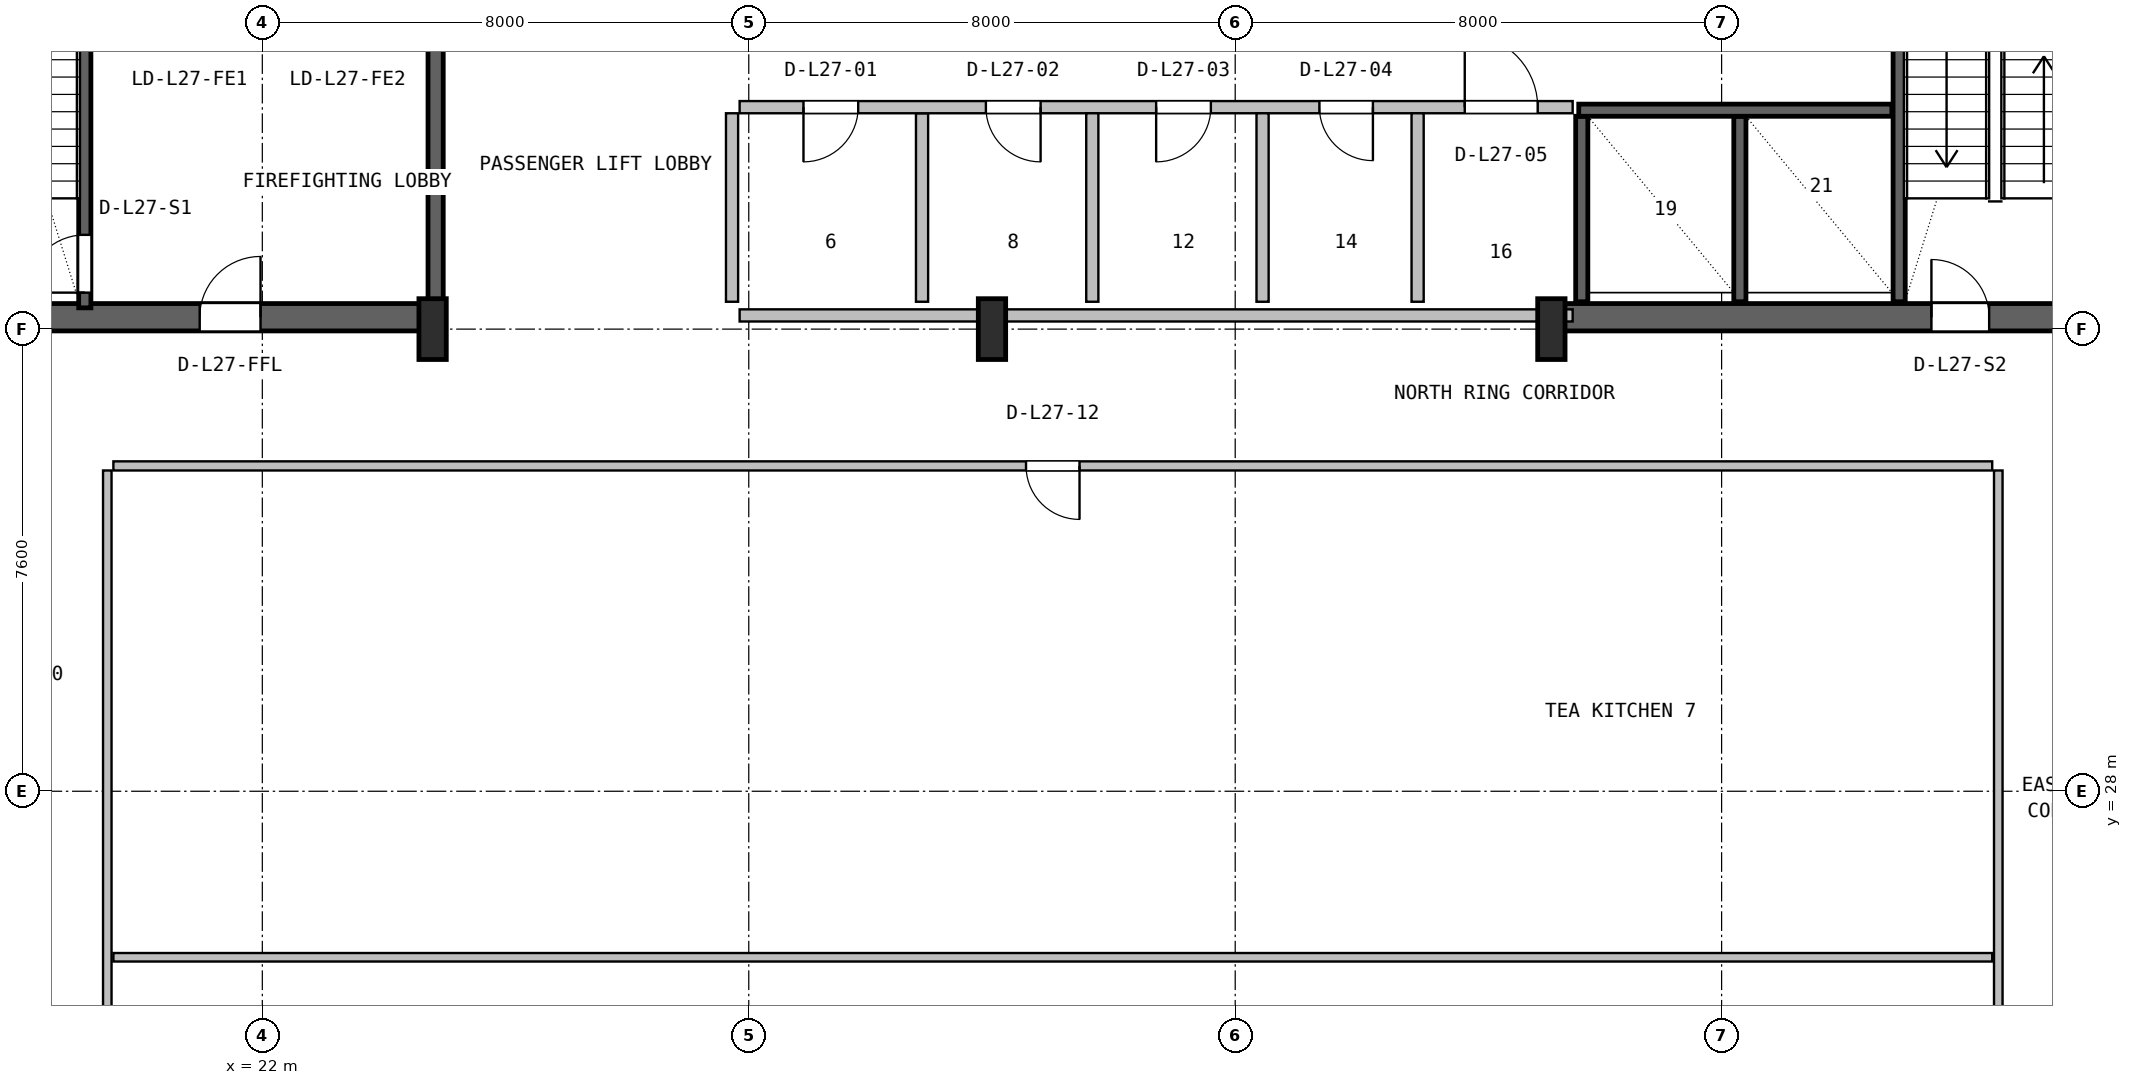
"""IFC4 building model, lengths in metres.
Left out: names, types, materials, properties, quantities, classifications, styles, units other than length and angle.
Written with IfcOpenShell. Run it as: python <this file> out.ifc"""

import sys

from ifc_helpers import new_model, si_unit, direction, frame, frame_2d, origin, origin_2d, place, context, subcontext, project, spatial, rectangle, i_section, extrude, source, transform, mapped, element, fill, save


model = new_model("IFC4")
c1 = context("Model", 3, precision=1e-05, world=origin(), true_north=direction((0.0, 1.0)))
c2 = subcontext(c1, "Body", "Model", "MODEL_VIEW")
j1 = project(units=[si_unit("LENGTHUNIT", "METRE"), si_unit("PLANEANGLEUNIT", "RADIAN")], contexts=[c1])
p1 = place(None, origin())
s1 = spatial("IfcSite", under=j1, at=p1, CompositionType="ELEMENT")
p2 = place(p1, origin())
s2 = spatial("IfcBuilding", under=s1, at=p2, CompositionType="ELEMENT")
p3 = place(p2, frame((0.0, 0.0, 114.4)))
s3 = spatial("IfcBuildingStorey", under=s2, at=p3, CompositionType="ELEMENT", Elevation=114.4)
p4 = place(p3, frame((15.57, 35.795, 0.0), z_axis=(0.0, 0.0, 1.0), x_axis=(1.0, 0.0, 0.0)))
e1 = element("IfcWall", 1, at=p4, inside=s3, PredefinedType="SHEAR", context=c2, shape_type="SweptSolid", body=[
    extrude(rectangle(XDim=9.23, YDim=0.45, at=frame_2d((4.615, 0.0))), origin(), (0.0, 0.0, 1.0), 3.55),
])
p5 = place(p4, frame((5.4, 0.0, 0.0)))
e2 = element("IfcOpeningElement", 2, at=p5, cuts=e1, PredefinedType="OPENING", context=c2, shape_type="SweptSolid", body=[
    extrude(rectangle(XDim=1.0, YDim=2.1, at=frame_2d((0.5, 1.05))), frame((0.0, 0.235, 0.0), z_axis=(0.0, -1.0, 0.0), x_axis=(1.0, 0.0, 0.0)), (0.0, 0.0, 1.0), 0.47),
])
p6 = place(p3, frame((43.2, 35.795, 0.0), z_axis=(0.0, 0.0, 1.0), x_axis=(1.0, 0.0, 0.0)))
e3 = element("IfcWall", 3, at=p6, inside=s3, PredefinedType="SHEAR", context=c2, shape_type="SweptSolid", body=[
    extrude(rectangle(XDim=9.23, YDim=0.45, at=frame_2d((4.615, 0.0))), origin(), (0.0, 0.0, 1.0), 3.55),
])
p7 = place(p6, frame((6.25, 0.0, 0.0)))
e4 = element("IfcOpeningElement", 4, at=p7, cuts=e3, PredefinedType="OPENING", context=c2, shape_type="SweptSolid", body=[
    extrude(rectangle(XDim=0.95, YDim=2.1, at=frame_2d((0.475, 1.05))), frame((0.0, 0.235, 0.0), z_axis=(0.0, -1.0, 0.0), x_axis=(1.0, 0.0, 0.0)), (0.0, 0.0, 1.0), 0.47),
])
m1 = source(origin(), c2, "Body", "SweptSolid", [
    extrude(i_section(OverallWidth=0.45, OverallDepth=1.0, WebThickness=0.016, FlangeThickness=0.03, FilletRadius=0.016, at=origin_2d()), origin(), (0.0, 0.0, 1.0), 3.8),
])
for number, where, z_axis, x_axis in (
    (5, (24.8, 35.6, 0.0), (0.0, 0.0, 1.0), (1.0, 0.0, 0.0)),
    (6, (34.0, 35.6, 0.0), (0.0, 0.0, 1.0), (1.0, 0.0, 0.0)),
    (7, (43.2, 35.6, 0.0), (0.0, 0.0, 1.0), (1.0, 0.0, 0.0)),
):
    element("IfcColumn", number, at=place(p3, frame(where, z_axis=z_axis, x_axis=x_axis)), inside=s3, PredefinedType="COLUMN", context=c2, shape_type="MappedRepresentation", body=[
        mapped(m1, transform((0.0, 0.0, 0.0), x_axis=(1.0, 0.0, 0.0), y_axis=(0.0, 1.0, 0.0), z_axis=(0.0, 0.0, 1.0), scale=1.0)),
    ])
p8 = place(p3, frame((19.08, 35.95, 0.0), z_axis=(0.0, 0.0, 1.0), x_axis=(0.0, 1.0, 0.0)))
e8 = element("IfcWall", 8, at=p8, inside=s3, PredefinedType="SHEAR", context=c2, shape_type="SweptSolid", body=[
    extrude(rectangle(XDim=9.65, YDim=0.2, at=frame_2d((4.825, 0.0))), origin(), (0.0, 0.0, 1.0), 3.55),
])
p9 = place(p8, frame((0.25, 0.0, 0.0)))
e9 = element("IfcOpeningElement", 9, at=p9, cuts=e8, PredefinedType="OPENING", context=c2, shape_type="SweptSolid", body=[
    extrude(rectangle(XDim=0.95, YDim=2.1, at=frame_2d((0.475, 1.05))), frame((0.0, 0.11, 0.0), z_axis=(0.0, -1.0, 0.0), x_axis=(1.0, 0.0, 0.0)), (0.0, 0.0, 1.0), 0.22),
])
p10 = place(p3, frame((24.85, 36.05, 0.0), z_axis=(0.0, 0.0, 1.0), x_axis=(0.0, 1.0, 0.0)))
e10 = element("IfcWall", 10, at=p10, inside=s3, PredefinedType="SHEAR", context=c2, shape_type="SweptSolid", body=[
    extrude(rectangle(XDim=10.45, YDim=0.25, at=frame_2d((5.225, 0.0))), origin(), (0.0, 0.0, 1.0), 3.55),
])
p11 = place(p3, frame((48.92, 36.05, 0.0), z_axis=(0.0, 0.0, 1.0), x_axis=(0.0, 1.0, 0.0)))
e11 = element("IfcWall", 11, at=p11, inside=s3, PredefinedType="SHEAR", context=c2, shape_type="SweptSolid", body=[
    extrude(rectangle(XDim=10.5, YDim=0.2, at=frame_2d((5.25, 0.0))), origin(), (0.0, 0.0, 1.0), 3.55),
])
for number, where, z_axis, x_axis in (
    (12, (43.7, 36.05, 0.0), (0.0, 0.0, 1.0), (0.0, 1.0, 0.0)),
    (13, (46.3, 36.05, 0.0), (0.0, 0.0, 1.0), (0.0, 1.0, 0.0)),
):
    element("IfcWall", number, at=place(p3, frame(where, z_axis=z_axis, x_axis=x_axis)), inside=s3, PredefinedType="SHEAR", context=c2, shape_type="SweptSolid", body=[
        extrude(rectangle(XDim=3.05, YDim=0.2, at=frame_2d((1.525, 0.0))), origin(), (0.0, 0.0, 1.0), 3.55),
    ])
p12 = place(p3, frame((43.65, 39.2, 0.0), z_axis=(0.0, 0.0, 1.0), x_axis=(1.0, 0.0, 0.0)))
e14 = element("IfcWall", 14, at=p12, inside=s3, PredefinedType="SHEAR", context=c2, shape_type="SweptSolid", body=[
    extrude(rectangle(XDim=5.15, YDim=0.2, at=frame_2d((2.575, 0.0))), origin(), (0.0, 0.0, 1.0), 3.55),
])
p13 = place(p3, frame((29.85, 35.825, 0.0), z_axis=(0.0, 0.0, 1.0), x_axis=(1.0, 0.0, 0.0)))
e15 = element("IfcWall", 15, at=p13, inside=s3, PredefinedType="SOLIDWALL", context=c2, shape_type="SweptSolid", body=[
    extrude(rectangle(XDim=13.7, YDim=0.2, at=frame_2d((6.85, 0.0))), origin(), (0.0, 0.0, 1.0), 2.325),
])
p14 = place(p3, frame((32.85, 36.05, 0.0), z_axis=(0.0, 0.0, 1.0), x_axis=(0.0, 1.0, 0.0)))
e16 = element("IfcWall", 16, at=p14, inside=s3, PredefinedType="PLUMBINGWALL", context=c2, shape_type="SweptSolid", body=[
    extrude(rectangle(XDim=3.1, YDim=0.2, at=frame_2d((1.55, 0.0))), origin(), (0.0, 0.0, 1.0), 3.53),
])
p15 = place(p3, frame((29.85, 39.25, 0.0), z_axis=(0.0, 0.0, 1.0), x_axis=(1.0, 0.0, 0.0)))
e17 = element("IfcWall", 17, at=p15, inside=s3, PredefinedType="SOLIDWALL", context=c2, shape_type="SweptSolid", body=[
    extrude(rectangle(XDim=13.7, YDim=0.2, at=frame_2d((6.85, 0.0))), origin(), (0.0, 0.0, 1.0), 3.53),
])
p16 = place(p15, frame((1.05, 0.0, 0.0)))
e18 = element("IfcOpeningElement", 18, at=p16, cuts=e17, PredefinedType="OPENING", context=c2, shape_type="SweptSolid", body=[
    extrude(rectangle(XDim=0.9, YDim=2.06, at=frame_2d((0.45, 1.03))), frame((0.0, 0.11, 0.0), z_axis=(0.0, -1.0, 0.0), x_axis=(1.0, 0.0, 0.0)), (0.0, 0.0, 1.0), 0.22),
])
p17 = place(p15, frame((4.05, 0.0, 0.0)))
e19 = element("IfcOpeningElement", 19, at=p17, cuts=e17, PredefinedType="OPENING", context=c2, shape_type="SweptSolid", body=[
    extrude(rectangle(XDim=0.9, YDim=2.06, at=frame_2d((0.45, 1.03))), frame((0.0, 0.11, 0.0), z_axis=(0.0, -1.0, 0.0), x_axis=(1.0, 0.0, 0.0)), (0.0, 0.0, 1.0), 0.22),
])
p18 = place(p15, frame((6.85, 0.0, 0.0)))
e20 = element("IfcOpeningElement", 20, at=p18, cuts=e17, PredefinedType="OPENING", context=c2, shape_type="SweptSolid", body=[
    extrude(rectangle(XDim=0.9, YDim=2.06, at=frame_2d((0.45, 1.03))), frame((0.0, 0.11, 0.0), z_axis=(0.0, -1.0, 0.0), x_axis=(1.0, 0.0, 0.0)), (0.0, 0.0, 1.0), 0.22),
])
p19 = place(p15, frame((9.535, 0.0, 0.0)))
e21 = element("IfcOpeningElement", 21, at=p19, cuts=e17, PredefinedType="OPENING", context=c2, shape_type="SweptSolid", body=[
    extrude(rectangle(XDim=0.88, YDim=2.06, at=frame_2d((0.44, 1.03))), frame((0.0, 0.11, 0.0), z_axis=(0.0, -1.0, 0.0), x_axis=(1.0, 0.0, 0.0)), (0.0, 0.0, 1.0), 0.22),
])
p20 = place(p15, frame((11.925, 0.0, 0.0)))
e22 = element("IfcOpeningElement", 22, at=p20, cuts=e17, PredefinedType="OPENING", context=c2, shape_type="SweptSolid", body=[
    extrude(rectangle(XDim=1.2, YDim=2.1, at=frame_2d((0.6, 1.05))), frame((0.0, 0.11, 0.0), z_axis=(0.0, -1.0, 0.0), x_axis=(1.0, 0.0, 0.0)), (0.0, 0.0, 1.0), 0.22),
])
for number, where, z_axis, x_axis in (
    (23, (29.725, 36.05, 0.0), (0.0, 0.0, 1.0), (0.0, 1.0, 0.0)),
    (24, (35.65, 36.05, 0.0), (0.0, 0.0, 1.0), (0.0, 1.0, 0.0)),
    (25, (38.45, 36.05, 0.0), (0.0, 0.0, 1.0), (0.0, 1.0, 0.0)),
):
    element("IfcWall", number, at=place(p3, frame(where, z_axis=z_axis, x_axis=x_axis)), inside=s3, PredefinedType="PLUMBINGWALL", context=c2, shape_type="SweptSolid", body=[
        extrude(rectangle(XDim=3.1, YDim=0.2, at=frame_2d((1.55, 0.0))), origin(), (0.0, 0.0, 1.0), 3.53),
    ])
p21 = place(p3, frame((41.0, 36.05, 0.0), z_axis=(0.0, 0.0, 1.0), x_axis=(0.0, 1.0, 0.0)))
e26 = element("IfcWall", 26, at=p21, inside=s3, PredefinedType="SOLIDWALL", context=c2, shape_type="SweptSolid", body=[
    extrude(rectangle(XDim=3.1, YDim=0.2, at=frame_2d((1.55, 0.0))), origin(), (0.0, 0.0, 1.0), 3.53),
])
p22 = place(p3, frame((50.55, 14.9, 0.0), z_axis=(0.0, 0.0, 1.0), x_axis=(0.0, 1.0, 0.0)))
e27 = element("IfcWall", 27, at=p22, inside=s3, PredefinedType="PARTITIONING", context=c2, shape_type="SweptSolid", body=[
    extrude(rectangle(XDim=18.375, YDim=0.14, at=frame_2d((9.188, 0.0))), origin(), (0.0, 0.0, 1.0), 3.222),
])
p23 = place(p3, frame((19.55, 25.27, 0.0), z_axis=(0.0, 0.0, 1.0), x_axis=(1.0, 0.0, 0.0)))
e28 = element("IfcWall", 28, at=p23, inside=s3, PredefinedType="PARTITIONING", context=c2, shape_type="SweptSolid", body=[
    extrude(rectangle(XDim=30.9, YDim=0.14, at=frame_2d((15.45, 0.0))), origin(), (0.0, 0.0, 1.0), 2.83),
])
p24 = place(p3, frame((19.45, 14.9, 0.0), z_axis=(0.0, 0.0, 1.0), x_axis=(0.0, 1.0, 0.0)))
e29 = element("IfcWall", 29, at=p24, inside=s3, PredefinedType="PARTITIONING", context=c2, shape_type="SweptSolid", body=[
    extrude(rectangle(XDim=18.375, YDim=0.14, at=frame_2d((9.188, 0.0))), origin(), (0.0, 0.0, 1.0), 3.222),
])
p25 = place(p3, frame((19.55, 33.35, 0.0), z_axis=(0.0, 0.0, 1.0), x_axis=(1.0, 0.0, 0.0)))
e30 = element("IfcWall", 30, at=p25, inside=s3, PredefinedType="PARTITIONING", context=c2, shape_type="SweptSolid", body=[
    extrude(rectangle(XDim=30.9, YDim=0.15, at=frame_2d((15.45, 0.0))), origin(), (0.0, 0.0, 1.0), 2.83),
])
p26 = place(p25, frame((15.01, 0.0, 0.0)))
e31 = element("IfcOpeningElement", 31, at=p26, cuts=e30, PredefinedType="OPENING", context=c2, shape_type="SweptSolid", body=[
    extrude(rectangle(XDim=0.88, YDim=2.06, at=frame_2d((0.44, 1.03))), frame((0.0, 0.085, 0.0), z_axis=(0.0, -1.0, 0.0), x_axis=(1.0, 0.0, 0.0)), (0.0, 0.0, 1.0), 0.17),
])
m2 = source(origin(), c2, "Body", "SweptSolid", [
    extrude(rectangle(XDim=0.95, YDim=2.1, at=frame_2d((0.475, 1.05))), frame((0.0, 0.025, 0.0), z_axis=(0.0, -1.0, 0.0), x_axis=(1.0, 0.0, 0.0)), (0.0, 0.0, 1.0), 0.05),
])
p27 = place(p9, origin())
e32 = element("IfcDoor", 32, at=p27, inside=s3, OperationType="SINGLE_SWING_LEFT", PredefinedType="DOOR", context=c2, shape_type="MappedRepresentation", body=[
    mapped(m2, transform((0.0, 0.0, 0.0), x_axis=(1.0, 0.0, 0.0), y_axis=(0.0, 1.0, 0.0), z_axis=(0.0, 0.0, 1.0), scale=1.0)),
])
fill(e9, e32)
m3 = source(origin(), c2, "Body", "SweptSolid", [
    extrude(rectangle(XDim=1.0, YDim=2.1, at=frame_2d((0.5, 1.05))), frame((0.0, 0.025, 0.0), z_axis=(0.0, -1.0, 0.0), x_axis=(1.0, 0.0, 0.0)), (0.0, 0.0, 1.0), 0.05),
])
p28 = place(p5, origin())
e33 = element("IfcDoor", 33, at=p28, inside=s3, OperationType="SINGLE_SWING_RIGHT", PredefinedType="DOOR", context=c2, shape_type="MappedRepresentation", body=[
    mapped(m3, transform((0.0, 0.0, 0.0), x_axis=(1.0, 0.0, 0.0), y_axis=(0.0, 1.0, 0.0), z_axis=(0.0, 0.0, 1.0), scale=1.0)),
])
fill(e2, e33)
p29 = place(p7, origin())
e34 = element("IfcDoor", 34, at=p29, inside=s3, OperationType="SINGLE_SWING_LEFT", PredefinedType="DOOR", context=c2, shape_type="MappedRepresentation", body=[
    mapped(m2, transform((0.0, 0.0, 0.0), x_axis=(1.0, 0.0, 0.0), y_axis=(0.0, 1.0, 0.0), z_axis=(0.0, 0.0, 1.0), scale=1.0)),
])
fill(e4, e34)
m4 = source(origin(), c2, "Body", "SweptSolid", [
    extrude(rectangle(XDim=0.9, YDim=2.06, at=frame_2d((0.45, 1.03))), frame((0.0, 0.025, 0.0), z_axis=(0.0, -1.0, 0.0), x_axis=(1.0, 0.0, 0.0)), (0.0, 0.0, 1.0), 0.05),
])
p30 = place(p16, frame((0.9, 0.0, 0.0), z_axis=(0.0, 0.0, 1.0), x_axis=(-1.0, 0.0, 0.0)))
e35 = element("IfcDoor", 35, at=p30, inside=s3, OperationType="SINGLE_SWING_LEFT", PredefinedType="DOOR", context=c2, shape_type="MappedRepresentation", body=[
    mapped(m4, transform((0.0, 0.0, 0.0), x_axis=(1.0, 0.0, 0.0), y_axis=(0.0, 1.0, 0.0), z_axis=(0.0, 0.0, 1.0), scale=1.0)),
])
fill(e18, e35)
p31 = place(p17, frame((0.9, 0.0, 0.0), z_axis=(0.0, 0.0, 1.0), x_axis=(-1.0, 0.0, 0.0)))
e36 = element("IfcDoor", 36, at=p31, inside=s3, OperationType="SINGLE_SWING_RIGHT", PredefinedType="DOOR", context=c2, shape_type="MappedRepresentation", body=[
    mapped(m4, transform((0.0, 0.0, 0.0), x_axis=(1.0, 0.0, 0.0), y_axis=(0.0, 1.0, 0.0), z_axis=(0.0, 0.0, 1.0), scale=1.0)),
])
fill(e19, e36)
p32 = place(p18, frame((0.9, 0.0, 0.0), z_axis=(0.0, 0.0, 1.0), x_axis=(-1.0, 0.0, 0.0)))
e37 = element("IfcDoor", 37, at=p32, inside=s3, OperationType="SINGLE_SWING_LEFT", PredefinedType="DOOR", context=c2, shape_type="MappedRepresentation", body=[
    mapped(m4, transform((0.0, 0.0, 0.0), x_axis=(1.0, 0.0, 0.0), y_axis=(0.0, 1.0, 0.0), z_axis=(0.0, 0.0, 1.0), scale=1.0)),
])
fill(e20, e37)
m5 = source(origin(), c2, "Body", "SweptSolid", [
    extrude(rectangle(XDim=0.88, YDim=2.06, at=frame_2d((0.44, 1.03))), frame((0.0, 0.025, 0.0), z_axis=(0.0, -1.0, 0.0), x_axis=(1.0, 0.0, 0.0)), (0.0, 0.0, 1.0), 0.05),
])
p33 = place(p19, frame((0.88, 0.0, 0.0), z_axis=(0.0, 0.0, 1.0), x_axis=(-1.0, 0.0, 0.0)))
e38 = element("IfcDoor", 38, at=p33, inside=s3, OperationType="SINGLE_SWING_RIGHT", PredefinedType="DOOR", context=c2, shape_type="MappedRepresentation", body=[
    mapped(m5, transform((0.0, 0.0, 0.0), x_axis=(1.0, 0.0, 0.0), y_axis=(0.0, 1.0, 0.0), z_axis=(0.0, 0.0, 1.0), scale=1.0)),
])
fill(e21, e38)
m6 = source(origin(), c2, "Body", "SweptSolid", [
    extrude(rectangle(XDim=1.2, YDim=2.1, at=frame_2d((0.6, 1.05))), frame((0.0, 0.025, 0.0), z_axis=(0.0, -1.0, 0.0), x_axis=(1.0, 0.0, 0.0)), (0.0, 0.0, 1.0), 0.05),
])
p34 = place(p20, origin())
e39 = element("IfcDoor", 39, at=p34, inside=s3, OperationType="SINGLE_SWING_LEFT", PredefinedType="DOOR", context=c2, shape_type="MappedRepresentation", body=[
    mapped(m6, transform((0.0, 0.0, 0.0), x_axis=(1.0, 0.0, 0.0), y_axis=(0.0, 1.0, 0.0), z_axis=(0.0, 0.0, 1.0), scale=1.0)),
])
fill(e22, e39)
p35 = place(p26, frame((0.88, 0.0, 0.0), z_axis=(0.0, 0.0, 1.0), x_axis=(-1.0, 0.0, 0.0)))
e40 = element("IfcDoor", 40, at=p35, inside=s3, OperationType="SINGLE_SWING_RIGHT", PredefinedType="DOOR", context=c2, shape_type="MappedRepresentation", body=[
    mapped(m5, transform((0.0, 0.0, 0.0), x_axis=(1.0, 0.0, 0.0), y_axis=(0.0, 1.0, 0.0), z_axis=(0.0, 0.0, 1.0), scale=1.0)),
])
fill(e31, e40)
save(model, sys.argv[1])
